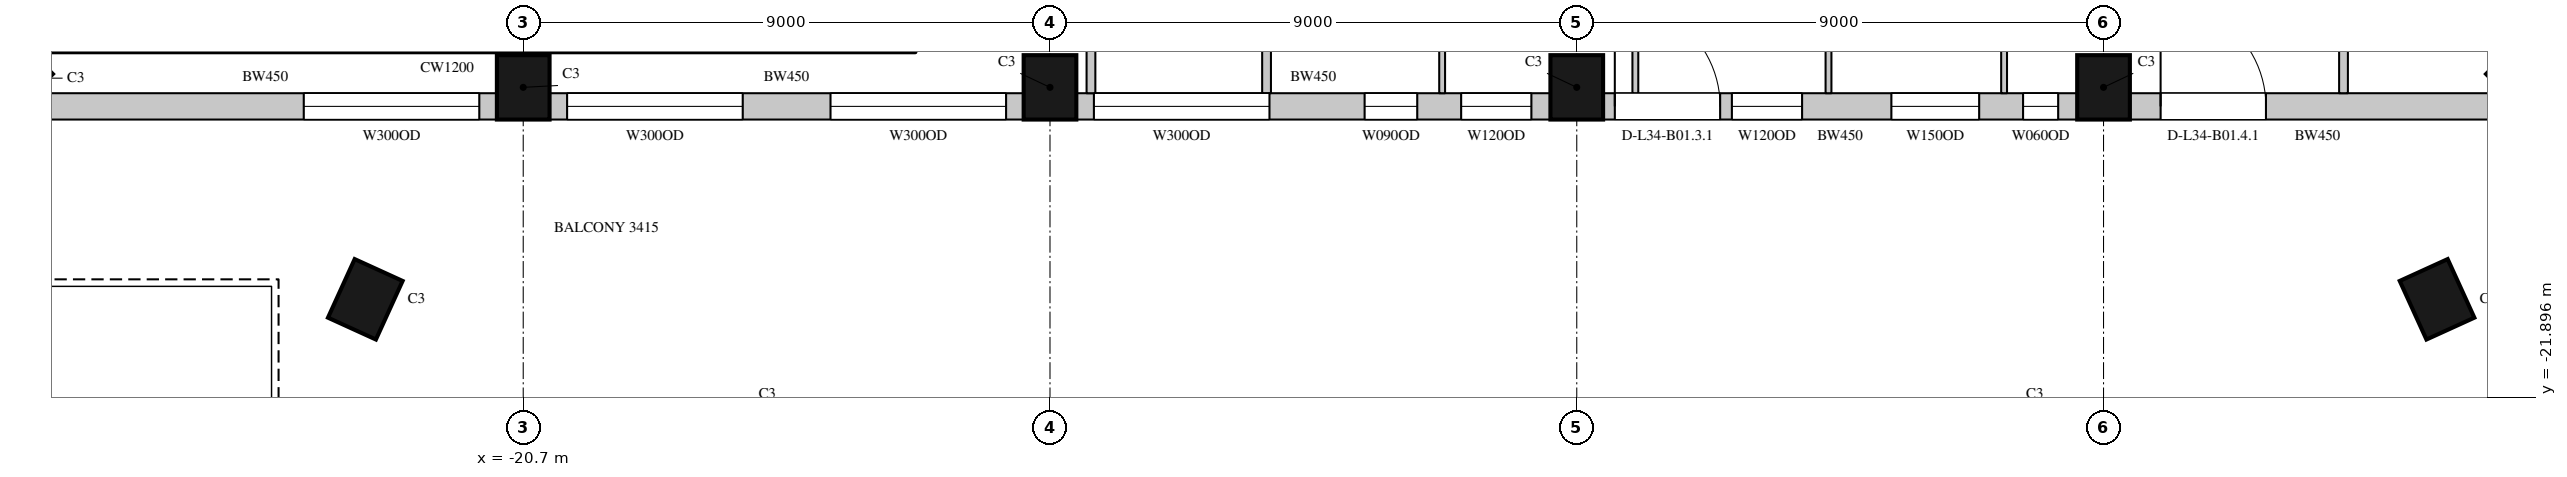
"""IFC4 building model, lengths in metres.
Left out: names, types, materials, properties, quantities, classifications, styles, units other than length and angle.
Written with IfcOpenShell. Run it as: python <this file> out.ifc"""

import sys

from ifc_helpers import new_model, si_unit, direction, frame, frame_2d, origin, origin_2d, place, context, subcontext, project, spatial, rectangle, extrude, element, fill, save


model = new_model("IFC4")
c1 = context("Model", 3, precision=1e-05, world=origin(), true_north=direction((0.0, 1.0)))
c2 = subcontext(c1, "Body", "Model", "MODEL_VIEW")
j1 = project(units=[si_unit("LENGTHUNIT", "METRE"), si_unit("PLANEANGLEUNIT", "RADIAN")], contexts=[c1])
p1 = place(None, origin())
s1 = spatial("IfcSite", under=j1, at=p1, CompositionType="ELEMENT")
p2 = place(p1, origin())
s2 = spatial("IfcBuilding", under=s1, at=p2, CompositionType="ELEMENT")
p3 = place(p2, frame((0.0, 0.0, 160.5)))
s3 = spatial("IfcBuildingStorey", under=s2, at=p3, CompositionType="ELEMENT", Elevation=160.5)
for number, where, z_axis, x_axis in (
    (1, (-29.443, -16.443, 0.0), (0.0, 0.0, 1.0), (0.707, -0.707, 0.0)),
    (2, (-20.7, -16.6, 0.0), (0.0, 0.0, 1.0), (1.0, 0.0, 0.0)),
    (3, (-11.7, -16.6, 0.0), (0.0, 0.0, 1.0), (1.0, 0.0, 0.0)),
    (4, (-2.7, -16.6, 0.0), (0.0, 0.0, 1.0), (1.0, 0.0, 0.0)),
    (5, (6.3, -16.6, 0.0), (0.0, 0.0, 1.0), (1.0, 0.0, 0.0)),
    (6, (13.543, -16.443, 0.0), (0.0, 0.0, 1.0), (0.707, 0.707, 0.0)),
    (7, (-23.398, -20.221, 0.0), (0.0, 0.0, 1.0), (0.91, -0.415, 0.0)),
    (8, (11.998, -20.221, 0.0), (0.0, 0.0, 1.0), (0.91, 0.415, 0.0)),
):
    element("IfcColumn", number, at=place(p3, frame(where, z_axis=z_axis, x_axis=x_axis)), inside=s3, PredefinedType="COLUMN", context=c2, shape_type="SweptSolid", body=[
        extrude(rectangle(XDim=0.9, YDim=1.1, at=origin_2d()), origin(), (0.0, 0.0, 1.0), 4.1),
    ])
p4 = place(p3, frame((-29.064, -16.925, 0.0), z_axis=(0.0, 0.0, 1.0), x_axis=(1.0, 0.0, 0.0)))
e9 = element("IfcWall", 9, at=p4, inside=s3, PredefinedType="SOLIDWALL", context=c2, shape_type="SweptSolid", body=[
    extrude(rectangle(XDim=7.914, YDim=0.45, at=frame_2d((3.957, 0.0))), origin(), (0.0, 0.0, 1.0), 3.8),
])
p5 = place(p4, frame((4.614, 0.0, 1.05)))
e10 = element("IfcOpeningElement", 10, at=p5, cuts=e9, PredefinedType="OPENING", context=c2, shape_type="SweptSolid", body=[
    extrude(rectangle(XDim=3.0, YDim=2.4, at=frame_2d((1.5, 1.2))), frame((0.0, 0.235, 0.0), z_axis=(0.0, -1.0, 0.0), x_axis=(1.0, 0.0, 0.0)), (0.0, 0.0, 1.0), 0.47),
])
p6 = place(p3, frame((-20.25, -16.925, 0.0), z_axis=(0.0, 0.0, 1.0), x_axis=(1.0, 0.0, 0.0)))
e11 = element("IfcWall", 11, at=p6, inside=s3, PredefinedType="SOLIDWALL", context=c2, shape_type="SweptSolid", body=[
    extrude(rectangle(XDim=8.1, YDim=0.45, at=frame_2d((4.05, 0.0))), origin(), (0.0, 0.0, 1.0), 3.8),
])
p7 = place(p6, frame((0.3, 0.0, 1.05)))
e12 = element("IfcOpeningElement", 12, at=p7, cuts=e11, PredefinedType="OPENING", context=c2, shape_type="SweptSolid", body=[
    extrude(rectangle(XDim=3.0, YDim=2.4, at=frame_2d((1.5, 1.2))), frame((0.0, 0.235, 0.0), z_axis=(0.0, -1.0, 0.0), x_axis=(1.0, 0.0, 0.0)), (0.0, 0.0, 1.0), 0.47),
])
p8 = place(p6, frame((4.8, 0.0, 1.05)))
e13 = element("IfcOpeningElement", 13, at=p8, cuts=e11, PredefinedType="OPENING", context=c2, shape_type="SweptSolid", body=[
    extrude(rectangle(XDim=3.0, YDim=2.4, at=frame_2d((1.5, 1.2))), frame((0.0, 0.235, 0.0), z_axis=(0.0, -1.0, 0.0), x_axis=(1.0, 0.0, 0.0)), (0.0, 0.0, 1.0), 0.47),
])
p9 = place(p3, frame((-11.25, -16.925, 0.0), z_axis=(0.0, 0.0, 1.0), x_axis=(1.0, 0.0, 0.0)))
e14 = element("IfcWall", 14, at=p9, inside=s3, PredefinedType="SOLIDWALL", context=c2, shape_type="SweptSolid", body=[
    extrude(rectangle(XDim=8.1, YDim=0.45, at=frame_2d((4.05, 0.0))), origin(), (0.0, 0.0, 1.0), 3.8),
])
p10 = place(p9, frame((0.3, 0.0, 1.05)))
e15 = element("IfcOpeningElement", 15, at=p10, cuts=e14, PredefinedType="OPENING", context=c2, shape_type="SweptSolid", body=[
    extrude(rectangle(XDim=3.0, YDim=2.4, at=frame_2d((1.5, 1.2))), frame((0.0, 0.235, 0.0), z_axis=(0.0, -1.0, 0.0), x_axis=(1.0, 0.0, 0.0)), (0.0, 0.0, 1.0), 0.47),
])
p11 = place(p9, frame((4.925, 0.0, 1.05)))
e16 = element("IfcOpeningElement", 16, at=p11, cuts=e14, PredefinedType="OPENING", context=c2, shape_type="SweptSolid", body=[
    extrude(rectangle(XDim=0.9, YDim=2.4, at=frame_2d((0.45, 1.2))), frame((0.0, 0.235, 0.0), z_axis=(0.0, -1.0, 0.0), x_axis=(1.0, 0.0, 0.0)), (0.0, 0.0, 1.0), 0.47),
])
p12 = place(p9, frame((6.575, 0.0, 1.05)))
e17 = element("IfcOpeningElement", 17, at=p12, cuts=e14, PredefinedType="OPENING", context=c2, shape_type="SweptSolid", body=[
    extrude(rectangle(XDim=1.2, YDim=2.4, at=frame_2d((0.6, 1.2))), frame((0.0, 0.235, 0.0), z_axis=(0.0, -1.0, 0.0), x_axis=(1.0, 0.0, 0.0)), (0.0, 0.0, 1.0), 0.47),
])
p13 = place(p3, frame((-2.25, -16.925, 0.0), z_axis=(0.0, 0.0, 1.0), x_axis=(1.0, 0.0, 0.0)))
e18 = element("IfcWall", 18, at=p13, inside=s3, PredefinedType="SOLIDWALL", context=c2, shape_type="SweptSolid", body=[
    extrude(rectangle(XDim=8.1, YDim=0.45, at=frame_2d((4.05, 0.0))), origin(), (0.0, 0.0, 1.0), 3.8),
])
p14 = place(p13, frame((0.2, 0.0, 0.0)))
e19 = element("IfcOpeningElement", 19, at=p14, cuts=e18, PredefinedType="OPENING", context=c2, shape_type="SweptSolid", body=[
    extrude(rectangle(XDim=1.8, YDim=2.4, at=frame_2d((0.9, 1.2))), frame((0.0, 0.235, 0.0), z_axis=(0.0, -1.0, 0.0), x_axis=(1.0, 0.0, 0.0)), (0.0, 0.0, 1.0), 0.47),
])
p15 = place(p13, frame((2.2, 0.0, 1.05)))
e20 = element("IfcOpeningElement", 20, at=p15, cuts=e18, PredefinedType="OPENING", context=c2, shape_type="SweptSolid", body=[
    extrude(rectangle(XDim=1.2, YDim=2.4, at=frame_2d((0.6, 1.2))), frame((0.0, 0.235, 0.0), z_axis=(0.0, -1.0, 0.0), x_axis=(1.0, 0.0, 0.0)), (0.0, 0.0, 1.0), 0.47),
])
p16 = place(p13, frame((4.926, 0.0, 1.05)))
e21 = element("IfcOpeningElement", 21, at=p16, cuts=e18, PredefinedType="OPENING", context=c2, shape_type="SweptSolid", body=[
    extrude(rectangle(XDim=1.5, YDim=2.4, at=frame_2d((0.75, 1.2))), frame((0.0, 0.235, 0.0), z_axis=(0.0, -1.0, 0.0), x_axis=(1.0, 0.0, 0.0)), (0.0, 0.0, 1.0), 0.47),
])
p17 = place(p13, frame((7.176, 0.0, 1.05)))
e22 = element("IfcOpeningElement", 22, at=p17, cuts=e18, PredefinedType="OPENING", context=c2, shape_type="SweptSolid", body=[
    extrude(rectangle(XDim=0.6, YDim=2.4, at=frame_2d((0.3, 1.2))), frame((0.0, 0.235, 0.0), z_axis=(0.0, -1.0, 0.0), x_axis=(1.0, 0.0, 0.0)), (0.0, 0.0, 1.0), 0.47),
])
p18 = place(p3, frame((6.75, -16.925, 0.0), z_axis=(0.0, 0.0, 1.0), x_axis=(1.0, 0.0, 0.0)))
e23 = element("IfcWall", 23, at=p18, inside=s3, PredefinedType="SOLIDWALL", context=c2, shape_type="SweptSolid", body=[
    extrude(rectangle(XDim=6.414, YDim=0.45, at=frame_2d((3.207, 0.0))), origin(), (0.0, 0.0, 1.0), 3.8),
])
p19 = place(p18, frame((0.525, 0.0, 0.0)))
e24 = element("IfcOpeningElement", 24, at=p19, cuts=e23, PredefinedType="OPENING", context=c2, shape_type="SweptSolid", body=[
    extrude(rectangle(XDim=1.8, YDim=2.4, at=frame_2d((0.9, 1.2))), frame((0.0, 0.235, 0.0), z_axis=(0.0, -1.0, 0.0), x_axis=(1.0, 0.0, 0.0)), (0.0, 0.0, 1.0), 0.47),
])
p20 = place(p3, frame((-26.95, -18.0, 0.0), z_axis=(0.0, 0.0, 1.0), x_axis=(1.0, 0.0, 0.0)))
e25 = element("IfcWall", 25, at=p20, inside=s3, PredefinedType="SOLIDWALL", context=c2, shape_type="SweptSolid", body=[
    extrude(rectangle(XDim=2.36, YDim=0.45, at=frame_2d((1.18, 0.0))), origin(), (0.0, 0.0, 1.0), 0.6),
])
for number, where, z_axis, x_axis in (
    (26, (-23.69, -18.0, 0.0), (0.0, 0.0, 1.0), (1.0, 0.0, 0.0)),
    (27, (-19.73, -18.0, 0.0), (0.0, 0.0, 1.0), (1.0, 0.0, 0.0)),
    (28, (-15.77, -18.0, 0.0), (0.0, 0.0, 1.0), (1.0, 0.0, 0.0)),
    (29, (-11.81, -18.0, 0.0), (0.0, 0.0, 1.0), (1.0, 0.0, 0.0)),
    (30, (-7.85, -18.0, 0.0), (0.0, 0.0, 1.0), (1.0, 0.0, 0.0)),
):
    element("IfcWall", number, at=place(p3, frame(where, z_axis=z_axis, x_axis=x_axis)), inside=s3, PredefinedType="SOLIDWALL", context=c2, shape_type="SweptSolid", body=[
        extrude(rectangle(XDim=3.76, YDim=0.45, at=frame_2d((1.88, 0.0))), origin(), (0.0, 0.0, 1.0), 0.6),
    ])
p21 = place(p3, frame((-3.89, -18.0, 0.0), z_axis=(0.0, 0.0, 1.0), x_axis=(1.0, 0.0, 0.0)))
e31 = element("IfcWall", 31, at=p21, inside=s3, PredefinedType="SOLIDWALL", context=c2, shape_type="SweptSolid", body=[
    extrude(rectangle(XDim=1.54, YDim=0.45, at=frame_2d((0.77, 0.0))), origin(), (0.0, 0.0, 1.0), 0.6),
])
p22 = place(p3, frame((0.07, -18.0, 0.0), z_axis=(0.0, 0.0, 1.0), x_axis=(1.0, 0.0, 0.0)))
e32 = element("IfcWall", 32, at=p22, inside=s3, PredefinedType="SOLIDWALL", context=c2, shape_type="SweptSolid", body=[
    extrude(rectangle(XDim=3.76, YDim=0.45, at=frame_2d((1.88, 0.0))), origin(), (0.0, 0.0, 1.0), 0.6),
])
p23 = place(p3, frame((4.03, -18.0, 0.0), z_axis=(0.0, 0.0, 1.0), x_axis=(1.0, 0.0, 0.0)))
e33 = element("IfcWall", 33, at=p23, inside=s3, PredefinedType="SOLIDWALL", context=c2, shape_type="SweptSolid", body=[
    extrude(rectangle(XDim=2.945, YDim=0.45, at=frame_2d((1.473, 0.0))), origin(), (0.0, 0.0, 1.0), 0.6),
])
p24 = place(p3, frame((-11.0, -16.7, 0.0), z_axis=(0.0, 0.0, 1.0), x_axis=(0.0, 1.0, 0.0)))
e34 = element("IfcWall", 34, at=p24, inside=s3, PredefinedType="PARTITIONING", context=c2, shape_type="SweptSolid", body=[
    extrude(rectangle(XDim=1.88, YDim=0.15, at=frame_2d((0.94, 0.0))), origin(), (0.0, 0.0, 1.0), 3.8),
])
p25 = place(p3, frame((-8.0, -16.7, 0.0), z_axis=(0.0, 0.0, 1.0), x_axis=(0.0, 1.0, 0.0)))
e35 = element("IfcWall", 35, at=p25, inside=s3, PredefinedType="PARTITIONING", context=c2, shape_type="SweptSolid", body=[
    extrude(rectangle(XDim=5.2, YDim=0.15, at=frame_2d((2.6, 0.0))), origin(), (0.0, 0.0, 1.0), 3.8),
])
p26 = place(p3, frame((10.4, -16.7, 0.0), z_axis=(0.0, 0.0, 1.0), x_axis=(0.0, 1.0, 0.0)))
e36 = element("IfcWall", 36, at=p26, inside=s3, PredefinedType="PARTITIONING", context=c2, shape_type="SweptSolid", body=[
    extrude(rectangle(XDim=5.3, YDim=0.15, at=frame_2d((2.65, 0.0))), origin(), (0.0, 0.0, 1.0), 3.8),
])
for number, where, z_axis, x_axis in (
    (37, (-5.0, -16.7, 0.0), (0.0, 0.0, 1.0), (0.0, 1.0, 0.0)),
    (38, (-1.699, -16.7, 0.0), (0.0, 0.0, 1.0), (0.0, 1.0, 0.0)),
):
    element("IfcWall", number, at=place(p3, frame(where, z_axis=z_axis, x_axis=x_axis)), inside=s3, PredefinedType="PARTITIONING", context=c2, shape_type="SweptSolid", body=[
        extrude(rectangle(XDim=5.2, YDim=0.1, at=frame_2d((2.6, 0.0))), origin(), (0.0, 0.0, 1.0), 3.8),
    ])
p27 = place(p3, frame((1.601, -16.7, 0.0), z_axis=(0.0, 0.0, 1.0), x_axis=(0.0, 1.0, 0.0)))
e39 = element("IfcWall", 39, at=p27, inside=s3, PredefinedType="PARTITIONING", context=c2, shape_type="SweptSolid", body=[
    extrude(rectangle(XDim=5.2, YDim=0.1, at=frame_2d((2.6, 0.0))), origin(), (0.0, 0.0, 1.0), 3.15),
])
p28 = place(p3, frame((4.601, -16.7, 0.0), z_axis=(0.0, 0.0, 1.0), x_axis=(0.0, 1.0, 0.0)))
e40 = element("IfcWall", 40, at=p28, inside=s3, PredefinedType="PARTITIONING", context=c2, shape_type="SweptSolid", body=[
    extrude(rectangle(XDim=5.2, YDim=0.1, at=frame_2d((2.6, 0.0))), origin(), (0.0, 0.0, 1.0), 3.8),
])
p29 = place(p5, origin())
e41 = element("IfcWindow", 41, at=p29, inside=s3, PartitioningType="SINGLE_PANEL", PredefinedType="WINDOW", context=c2, shape_type="SweptSolid", body=[
    extrude(rectangle(XDim=3.0, YDim=2.4, at=frame_2d((1.5, 1.2))), frame((0.0, 0.135, 0.0), z_axis=(0.0, -1.0, 0.0), x_axis=(1.0, 0.0, 0.0)), (0.0, 0.0, 1.0), 0.06),
])
fill(e10, e41)
p30 = place(p7, origin())
e42 = element("IfcWindow", 42, at=p30, inside=s3, PartitioningType="SINGLE_PANEL", PredefinedType="WINDOW", context=c2, shape_type="SweptSolid", body=[
    extrude(rectangle(XDim=3.0, YDim=2.4, at=frame_2d((1.5, 1.2))), frame((0.0, 0.135, 0.0), z_axis=(0.0, -1.0, 0.0), x_axis=(1.0, 0.0, 0.0)), (0.0, 0.0, 1.0), 0.06),
])
fill(e12, e42)
p31 = place(p8, origin())
e43 = element("IfcWindow", 43, at=p31, inside=s3, PartitioningType="SINGLE_PANEL", PredefinedType="WINDOW", context=c2, shape_type="SweptSolid", body=[
    extrude(rectangle(XDim=3.0, YDim=2.4, at=frame_2d((1.5, 1.2))), frame((0.0, 0.135, 0.0), z_axis=(0.0, -1.0, 0.0), x_axis=(1.0, 0.0, 0.0)), (0.0, 0.0, 1.0), 0.06),
])
fill(e13, e43)
p32 = place(p10, origin())
e44 = element("IfcWindow", 44, at=p32, inside=s3, PartitioningType="SINGLE_PANEL", PredefinedType="WINDOW", context=c2, shape_type="SweptSolid", body=[
    extrude(rectangle(XDim=3.0, YDim=2.4, at=frame_2d((1.5, 1.2))), frame((0.0, 0.135, 0.0), z_axis=(0.0, -1.0, 0.0), x_axis=(1.0, 0.0, 0.0)), (0.0, 0.0, 1.0), 0.06),
])
fill(e15, e44)
p33 = place(p14, origin())
e45 = element("IfcDoor", 45, at=p33, inside=s3, OperationType="SLIDING_TO_LEFT", PredefinedType="DOOR", context=c2, shape_type="SweptSolid", body=[
    extrude(rectangle(XDim=1.8, YDim=2.4, at=frame_2d((0.9, 1.2))), frame((0.0, 0.13, 0.0), z_axis=(0.0, -1.0, 0.0), x_axis=(1.0, 0.0, 0.0)), (0.0, 0.0, 1.0), 0.05),
])
fill(e19, e45)
p34 = place(p15, origin())
e46 = element("IfcWindow", 46, at=p34, inside=s3, PartitioningType="SINGLE_PANEL", PredefinedType="WINDOW", context=c2, shape_type="SweptSolid", body=[
    extrude(rectangle(XDim=1.2, YDim=2.4, at=frame_2d((0.6, 1.2))), frame((0.0, 0.135, 0.0), z_axis=(0.0, -1.0, 0.0), x_axis=(1.0, 0.0, 0.0)), (0.0, 0.0, 1.0), 0.06),
])
fill(e20, e46)
p35 = place(p19, origin())
e47 = element("IfcDoor", 47, at=p35, inside=s3, OperationType="SLIDING_TO_LEFT", PredefinedType="DOOR", context=c2, shape_type="SweptSolid", body=[
    extrude(rectangle(XDim=1.8, YDim=2.4, at=frame_2d((0.9, 1.2))), frame((0.0, 0.13, 0.0), z_axis=(0.0, -1.0, 0.0), x_axis=(1.0, 0.0, 0.0)), (0.0, 0.0, 1.0), 0.05),
])
fill(e24, e47)
p36 = place(p11, origin())
e48 = element("IfcWindow", 48, at=p36, inside=s3, PartitioningType="SINGLE_PANEL", PredefinedType="WINDOW", context=c2, shape_type="SweptSolid", body=[
    extrude(rectangle(XDim=0.9, YDim=2.4, at=frame_2d((0.45, 1.2))), frame((0.0, 0.135, 0.0), z_axis=(0.0, -1.0, 0.0), x_axis=(1.0, 0.0, 0.0)), (0.0, 0.0, 1.0), 0.06),
])
fill(e16, e48)
p37 = place(p12, origin())
e49 = element("IfcWindow", 49, at=p37, inside=s3, PartitioningType="SINGLE_PANEL", PredefinedType="WINDOW", context=c2, shape_type="SweptSolid", body=[
    extrude(rectangle(XDim=1.2, YDim=2.4, at=frame_2d((0.6, 1.2))), frame((0.0, 0.135, 0.0), z_axis=(0.0, -1.0, 0.0), x_axis=(1.0, 0.0, 0.0)), (0.0, 0.0, 1.0), 0.06),
])
fill(e17, e49)
p38 = place(p16, origin())
e50 = element("IfcWindow", 50, at=p38, inside=s3, PartitioningType="SINGLE_PANEL", PredefinedType="WINDOW", context=c2, shape_type="SweptSolid", body=[
    extrude(rectangle(XDim=1.5, YDim=2.4, at=frame_2d((0.75, 1.2))), frame((0.0, 0.135, 0.0), z_axis=(0.0, -1.0, 0.0), x_axis=(1.0, 0.0, 0.0)), (0.0, 0.0, 1.0), 0.06),
])
fill(e21, e50)
p39 = place(p17, origin())
e51 = element("IfcWindow", 51, at=p39, inside=s3, PartitioningType="SINGLE_PANEL", PredefinedType="WINDOW", context=c2, shape_type="SweptSolid", body=[
    extrude(rectangle(XDim=0.6, YDim=2.4, at=frame_2d((0.3, 1.2))), frame((0.0, 0.135, 0.0), z_axis=(0.0, -1.0, 0.0), x_axis=(1.0, 0.0, 0.0)), (0.0, 0.0, 1.0), 0.06),
])
fill(e22, e51)
save(model, sys.argv[1])
